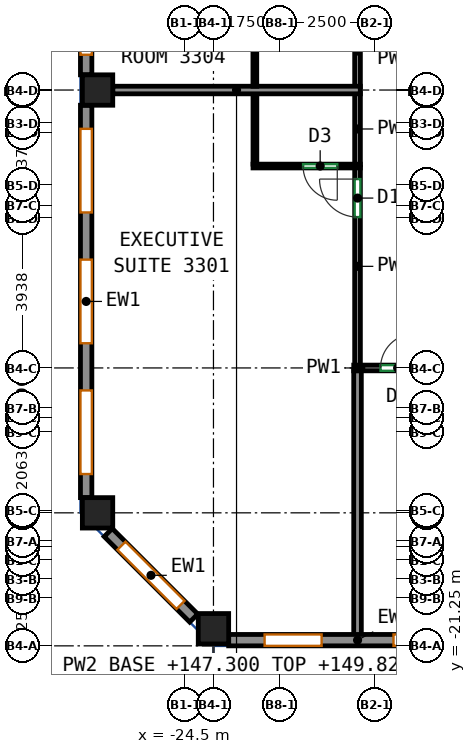
"""IFC4 building model, lengths in metres.
Left out: names, types, materials, properties, quantities, classifications, styles, units other than length and angle.
Written with IfcOpenShell. Run it as: python <this file> out.ifc"""

import sys

from ifc_helpers import new_model, si_unit, direction, frame, frame_2d, origin, origin_2d, place, context, subcontext, project, spatial, rectangle, extrude, source, transform, mapped, element, fill, save


model = new_model("IFC4")
c1 = context("Model", 3, precision=1e-05, world=origin(), true_north=direction((0.0, 1.0)))
c2 = subcontext(c1, "Body", "Model", "MODEL_VIEW")
j1 = project(units=[si_unit("LENGTHUNIT", "METRE"), si_unit("PLANEANGLEUNIT", "RADIAN")], contexts=[c1])
p1 = place(None, origin())
s1 = spatial("IfcSite", under=j1, at=p1, CompositionType="ELEMENT")
p2 = place(p1, origin())
s2 = spatial("IfcBuilding", under=s1, at=p2, CompositionType="ELEMENT")
p3 = place(p2, frame((0.0, 0.0, 147.3)))
s3 = spatial("IfcBuildingStorey", under=s2, at=p3, CompositionType="ELEMENT", Elevation=147.3)
m1 = source(origin(), c2, "Body", "SweptSolid", [
    extrude(rectangle(XDim=0.8, YDim=0.8, at=origin_2d()), origin(), (0.0, 0.0, 1.0), 3.12),
])
for number, where, z_axis, x_axis in (
    (1, (-26.8, -17.75, 0.0), (0.0, 0.0, 1.0), (1.0, 0.0, 0.0)),
    (2, (-26.8, -6.625, 0.0), (0.0, 0.0, 1.0), (1.0, 0.0, 0.0)),
    (3, (-23.75, -20.8, 0.0), (0.0, 0.0, 1.0), (1.0, 0.0, 0.0)),
):
    element("IfcColumn", number, at=place(p3, frame(where, z_axis=z_axis, x_axis=x_axis)), inside=s3, PredefinedType="COLUMN", context=c2, shape_type="MappedRepresentation", body=[
        mapped(m1, transform((0.0, 0.0, 0.0))),
    ])
m2 = source(origin(), c2, "Body", "SweptSolid", [
    extrude(rectangle(XDim=6.783, YDim=0.3, at=frame_2d((3.392, 0.0))), origin(), (0.0, 0.0, 1.0), 3.12),
])
p4 = place(p3, frame((-23.35, -21.1, 0.0), z_axis=(0.0, 0.0, 1.0), x_axis=(1.0, 0.0, 0.0)))
e4 = element("IfcWall", 4, at=p4, inside=s3, PredefinedType="SOLIDWALL", context=c2, shape_type="MappedRepresentation", body=[
    mapped(m2, transform((0.0, 0.0, 0.0))),
])
p5 = place(p4, frame((0.946, 0.0, 0.85)))
e5 = element("IfcOpeningElement", 5, at=p5, cuts=e4, PredefinedType="OPENING", context=c2, shape_type="SweptSolid", body=[
    extrude(rectangle(XDim=1.5, YDim=1.95, at=frame_2d((0.75, 0.975))), frame((0.0, 0.16, 0.0), z_axis=(0.0, -1.0, 0.0), x_axis=(1.0, 0.0, 0.0)), (0.0, 0.0, 1.0), 0.32),
])
p6 = place(p4, frame((4.337, 0.0, 0.85)))
e6 = element("IfcOpeningElement", 6, at=p6, cuts=e4, PredefinedType="OPENING", context=c2, shape_type="SweptSolid", body=[
    extrude(rectangle(XDim=1.5, YDim=1.95, at=frame_2d((0.75, 0.975))), frame((0.0, 0.16, 0.0), z_axis=(0.0, -1.0, 0.0), x_axis=(1.0, 0.0, 0.0)), (0.0, 0.0, 1.0), 0.32),
])
m3 = source(origin(), c2, "Body", "SweptSolid", [
    extrude(rectangle(XDim=6.513, YDim=0.3, at=frame_2d((3.256, 0.0))), origin(), (0.0, 0.0, 1.0), 3.12),
])
p7 = place(p3, frame((-27.1, 0.288, 0.0), z_axis=(0.0, 0.0, 1.0), x_axis=(0.0, -1.0, 0.0)))
e7 = element("IfcWall", 7, at=p7, inside=s3, PredefinedType="SOLIDWALL", context=c2, shape_type="MappedRepresentation", body=[
    mapped(m3, transform((0.0, 0.0, 0.0))),
])
p8 = place(p7, frame((0.528, 0.0, 0.85)))
e8 = element("IfcOpeningElement", 8, at=p8, cuts=e7, PredefinedType="OPENING", context=c2, shape_type="SweptSolid", body=[
    extrude(rectangle(XDim=2.2, YDim=1.95, at=frame_2d((1.1, 0.975))), frame((0.0, 0.16, 0.0), z_axis=(0.0, -1.0, 0.0), x_axis=(1.0, 0.0, 0.0)), (0.0, 0.0, 1.0), 0.32),
])
p9 = place(p7, frame((3.784, 0.0, 0.85)))
e9 = element("IfcOpeningElement", 9, at=p9, cuts=e7, PredefinedType="OPENING", context=c2, shape_type="SweptSolid", body=[
    extrude(rectangle(XDim=2.2, YDim=1.95, at=frame_2d((1.1, 0.975))), frame((0.0, 0.16, 0.0), z_axis=(0.0, -1.0, 0.0), x_axis=(1.0, 0.0, 0.0)), (0.0, 0.0, 1.0), 0.32),
])
m4 = source(origin(), c2, "Body", "SweptSolid", [
    extrude(rectangle(XDim=10.325, YDim=0.3, at=frame_2d((5.163, 0.0))), origin(), (0.0, 0.0, 1.0), 3.12),
])
p10 = place(p3, frame((-27.1, -7.025, 0.0), z_axis=(0.0, 0.0, 1.0), x_axis=(0.0, -1.0, 0.0)))
e10 = element("IfcWall", 10, at=p10, inside=s3, PredefinedType="SOLIDWALL", context=c2, shape_type="MappedRepresentation", body=[
    mapped(m4, transform((0.0, 0.0, 0.0))),
])
p11 = place(p10, frame((0.621, 0.0, 0.85)))
e11 = element("IfcOpeningElement", 11, at=p11, cuts=e10, PredefinedType="OPENING", context=c2, shape_type="SweptSolid", body=[
    extrude(rectangle(XDim=2.2, YDim=1.95, at=frame_2d((1.1, 0.975))), frame((0.0, 0.16, 0.0), z_axis=(0.0, -1.0, 0.0), x_axis=(1.0, 0.0, 0.0)), (0.0, 0.0, 1.0), 0.32),
])
p12 = place(p10, frame((4.062, 0.0, 0.85)))
e12 = element("IfcOpeningElement", 12, at=p12, cuts=e10, PredefinedType="OPENING", context=c2, shape_type="SweptSolid", body=[
    extrude(rectangle(XDim=2.2, YDim=1.95, at=frame_2d((1.1, 0.975))), frame((0.0, 0.16, 0.0), z_axis=(0.0, -1.0, 0.0), x_axis=(1.0, 0.0, 0.0)), (0.0, 0.0, 1.0), 0.32),
])
p13 = place(p10, frame((7.504, 0.0, 0.85)))
e13 = element("IfcOpeningElement", 13, at=p13, cuts=e10, PredefinedType="OPENING", context=c2, shape_type="SweptSolid", body=[
    extrude(rectangle(XDim=2.2, YDim=1.95, at=frame_2d((1.1, 0.975))), frame((0.0, 0.16, 0.0), z_axis=(0.0, -1.0, 0.0), x_axis=(1.0, 0.0, 0.0)), (0.0, 0.0, 1.0), 0.32),
])
m5 = source(origin(), c2, "Body", "SweptSolid", [
    extrude(rectangle(XDim=3.182, YDim=0.3, at=frame_2d((1.591, 0.0))), origin(), (0.0, 0.0, 1.0), 3.12),
])
p14 = place(p3, frame((-26.519, -18.269, 0.0), z_axis=(0.0, 0.0, 1.0), x_axis=(0.707068419229, -0.707145141063, 0.0)))
e14 = element("IfcWall", 14, at=p14, inside=s3, PredefinedType="SOLIDWALL", context=c2, shape_type="MappedRepresentation", body=[
    mapped(m5, transform((0.0, 0.0, 0.0))),
])
p15 = place(p14, frame((0.491, 0.0, 0.85)))
e15 = element("IfcOpeningElement", 15, at=p15, cuts=e14, PredefinedType="OPENING", context=c2, shape_type="SweptSolid", body=[
    extrude(rectangle(XDim=2.2, YDim=1.95, at=frame_2d((1.1, 0.975))), frame((0.0, 0.16, 0.0), z_axis=(0.0, -1.0, 0.0), x_axis=(1.0, 0.0, 0.0)), (0.0, 0.0, 1.0), 0.32),
])
p16 = place(p3, frame((-20.059, -13.938, 0.0), z_axis=(0.0, 0.0, 1.0), x_axis=(1.0, 0.0, 0.0)))
e16 = element("IfcWall", 16, at=p16, inside=s3, PredefinedType="PARTITIONING", context=c2, shape_type="SweptSolid", body=[
    extrude(rectangle(XDim=2.309, YDim=0.15, at=frame_2d((1.155, 0.0))), origin(), (0.0, 0.0, 1.0), 3.12),
])
p17 = place(p16, frame((0.705, 0.0, 0.0)))
e17 = element("IfcOpeningElement", 17, at=p17, cuts=e16, PredefinedType="OPENING", context=c2, shape_type="SweptSolid", body=[
    extrude(rectangle(XDim=0.9, YDim=2.1, at=frame_2d((0.45, 1.05))), frame((0.0, 0.085, 0.0), z_axis=(0.0, -1.0, 0.0), x_axis=(1.0, 0.0, 0.0)), (0.0, 0.0, 1.0), 0.17),
])
p18 = place(p3, frame((-19.959, -13.863, 0.0), z_axis=(0.0, 0.0, 1.0), x_axis=(0.0, 1.0, 0.0)))
e18 = element("IfcWall", 18, at=p18, inside=s3, PredefinedType="PARTITIONING", context=c2, shape_type="SweptSolid", body=[
    extrude(rectangle(XDim=5.198, YDim=0.15, at=frame_2d((2.599, 0.0))), origin(), (0.0, 0.0, 1.0), 3.12),
])
p19 = place(p18, frame((3.895, 0.0, 0.0)))
e19 = element("IfcOpeningElement", 19, at=p19, cuts=e18, PredefinedType="OPENING", context=c2, shape_type="SweptSolid", body=[
    extrude(rectangle(XDim=1.0, YDim=2.1, at=frame_2d((0.5, 1.05))), frame((0.0, 0.085, 0.0), z_axis=(0.0, -1.0, 0.0), x_axis=(1.0, 0.0, 0.0)), (0.0, 0.0, 1.0), 0.17),
])
for number, where, z_axis, x_axis in (
    (20, (-19.959, -8.585, 0.0), (0.0, 0.0, 1.0), (0.0, 1.0, 0.0)),
    (21, (-19.959, -6.535, 0.0), (0.0, 0.0, 1.0), (0.0, 1.0, 0.0)),
):
    element("IfcWall", number, at=place(p3, frame(where, z_axis=z_axis, x_axis=x_axis)), inside=s3, PredefinedType="PARTITIONING", context=c2, shape_type="SweptSolid", body=[
        extrude(rectangle(XDim=1.87, YDim=0.15, at=frame_2d((0.935, 0.0))), origin(), (0.0, 0.0, 1.0), 3.12),
    ])
p20 = place(p3, frame((-19.959, -21.0, 0.0), z_axis=(0.0, 0.0, 1.0), x_axis=(0.0, 1.0, 0.0)))
e22 = element("IfcWall", 22, at=p20, inside=s3, PredefinedType="PARTITIONING", context=c2, shape_type="SweptSolid", body=[
    extrude(rectangle(XDim=6.985, YDim=0.2, at=frame_2d((3.493, 0.0))), origin(), (0.0, 0.0, 1.0), 3.12),
])
p21 = place(p3, frame((-22.659, -8.575, 0.0), z_axis=(0.0, 0.0, 1.0), x_axis=(0.0, 1.0, 0.0)))
e23 = element("IfcWall", 23, at=p21, inside=s3, PredefinedType="PARTITIONING", context=c2, shape_type="SweptSolid", body=[
    extrude(rectangle(XDim=1.85, YDim=0.1, at=frame_2d((0.925, 0.0))), origin(), (0.0, 0.0, 1.0), 3.12),
])
p22 = place(p3, frame((-19.886, -8.625, 0.0), z_axis=(0.0, 0.0, 1.0), x_axis=(-1.0, 0.0, 0.0)))
e24 = element("IfcWall", 24, at=p22, inside=s3, PredefinedType="PARTITIONING", context=c2, shape_type="SweptSolid", body=[
    extrude(rectangle(XDim=2.823, YDim=0.1, at=frame_2d((1.412, 0.0))), origin(), (0.0, 0.0, 1.0), 3.12),
])
p23 = place(p22, frame((0.606, 0.0, 0.0)))
e25 = element("IfcOpeningElement", 25, at=p23, cuts=e24, PredefinedType="OPENING", context=c2, shape_type="SweptSolid", body=[
    extrude(rectangle(XDim=0.9, YDim=2.1, at=frame_2d((0.45, 1.05))), frame((0.0, 0.06, 0.0), z_axis=(0.0, -1.0, 0.0), x_axis=(1.0, 0.0, 0.0)), (0.0, 0.0, 1.0), 0.12),
])
p24 = place(p3, frame((-26.4, -6.625, 0.0), z_axis=(0.0, 0.0, 1.0), x_axis=(1.0, 0.0, 0.0)))
e26 = element("IfcWall", 26, at=p24, inside=s3, PredefinedType="PARTITIONING", context=c2, shape_type="SweptSolid", body=[
    extrude(rectangle(XDim=6.514, YDim=0.2, at=frame_2d((3.257, 0.0))), origin(), (0.0, 0.0, 1.0), 2.52),
])
p25 = place(p3, frame((-22.661, -6.525, 0.0), z_axis=(0.0, 0.0, 1.0), x_axis=(0.0, 1.0, 0.0)))
e27 = element("IfcWall", 27, at=p25, inside=s3, PredefinedType="PARTITIONING", context=c2, shape_type="SweptSolid", body=[
    extrude(rectangle(XDim=1.85, YDim=0.1, at=frame_2d((0.925, 0.0))), origin(), (0.0, 0.0, 1.0), 3.12),
])
p26 = place(p5, origin())
e28 = element("IfcWindow", 28, at=p26, inside=s3, PartitioningType="SINGLE_PANEL", PredefinedType="WINDOW", context=c2, shape_type="SweptSolid", body=[
    extrude(rectangle(XDim=1.5, YDim=1.95, at=frame_2d((0.75, 0.975))), frame((0.0, 0.03, 0.0), z_axis=(0.0, -1.0, 0.0), x_axis=(1.0, 0.0, 0.0)), (0.0, 0.0, 1.0), 0.06),
])
fill(e5, e28)
p27 = place(p6, origin())
e29 = element("IfcWindow", 29, at=p27, inside=s3, PartitioningType="SINGLE_PANEL", PredefinedType="WINDOW", context=c2, shape_type="SweptSolid", body=[
    extrude(rectangle(XDim=1.5, YDim=1.95, at=frame_2d((0.75, 0.975))), frame((0.0, 0.03, 0.0), z_axis=(0.0, -1.0, 0.0), x_axis=(1.0, 0.0, 0.0)), (0.0, 0.0, 1.0), 0.06),
])
fill(e6, e29)
p28 = place(p9, origin())
e30 = element("IfcWindow", 30, at=p28, inside=s3, PartitioningType="SINGLE_PANEL", PredefinedType="WINDOW", context=c2, shape_type="SweptSolid", body=[
    extrude(rectangle(XDim=2.2, YDim=1.95, at=frame_2d((1.1, 0.975))), frame((0.0, 0.03, 0.0), z_axis=(0.0, -1.0, 0.0), x_axis=(1.0, 0.0, 0.0)), (0.0, 0.0, 1.0), 0.06),
])
fill(e9, e30)
p29 = place(p11, origin())
e31 = element("IfcWindow", 31, at=p29, inside=s3, PartitioningType="SINGLE_PANEL", PredefinedType="WINDOW", context=c2, shape_type="SweptSolid", body=[
    extrude(rectangle(XDim=2.2, YDim=1.95, at=frame_2d((1.1, 0.975))), frame((0.0, 0.03, 0.0), z_axis=(0.0, -1.0, 0.0), x_axis=(1.0, 0.0, 0.0)), (0.0, 0.0, 1.0), 0.06),
])
fill(e11, e31)
p30 = place(p12, origin())
e32 = element("IfcWindow", 32, at=p30, inside=s3, PartitioningType="SINGLE_PANEL", PredefinedType="WINDOW", context=c2, shape_type="SweptSolid", body=[
    extrude(rectangle(XDim=2.2, YDim=1.95, at=frame_2d((1.1, 0.975))), frame((0.0, 0.03, 0.0), z_axis=(0.0, -1.0, 0.0), x_axis=(1.0, 0.0, 0.0)), (0.0, 0.0, 1.0), 0.06),
])
fill(e12, e32)
p31 = place(p13, origin())
e33 = element("IfcWindow", 33, at=p31, inside=s3, PartitioningType="SINGLE_PANEL", PredefinedType="WINDOW", context=c2, shape_type="SweptSolid", body=[
    extrude(rectangle(XDim=2.2, YDim=1.95, at=frame_2d((1.1, 0.975))), frame((0.0, 0.03, 0.0), z_axis=(0.0, -1.0, 0.0), x_axis=(1.0, 0.0, 0.0)), (0.0, 0.0, 1.0), 0.06),
])
fill(e13, e33)
p32 = place(p15, origin())
e34 = element("IfcWindow", 34, at=p32, inside=s3, PartitioningType="SINGLE_PANEL", PredefinedType="WINDOW", context=c2, shape_type="SweptSolid", body=[
    extrude(rectangle(XDim=2.2, YDim=1.95, at=frame_2d((1.1, 0.975))), frame((0.0, 0.03, 0.0), z_axis=(0.0, -1.0, 0.0), x_axis=(1.0, 0.0, 0.0)), (0.0, 0.0, 1.0), 0.06),
])
fill(e15, e34)
p33 = place(p17, origin())
e35 = element("IfcDoor", 35, at=p33, inside=s3, OperationType="SINGLE_SWING_RIGHT", PredefinedType="DOOR", context=c2, shape_type="SweptSolid", body=[
    extrude(rectangle(XDim=0.9, YDim=2.1, at=frame_2d((0.45, 1.05))), frame((0.0, 0.025, 0.0), z_axis=(0.0, -1.0, 0.0), x_axis=(1.0, 0.0, 0.0)), (0.0, 0.0, 1.0), 0.05),
])
fill(e17, e35)
p34 = place(p19, origin())
e36 = element("IfcDoor", 36, at=p34, inside=s3, OperationType="SINGLE_SWING_RIGHT", PredefinedType="DOOR", context=c2, shape_type="SweptSolid", body=[
    extrude(rectangle(XDim=1.0, YDim=2.1, at=frame_2d((0.5, 1.05))), frame((0.0, 0.025, 0.0), z_axis=(0.0, -1.0, 0.0), x_axis=(1.0, 0.0, 0.0)), (0.0, 0.0, 1.0), 0.05),
])
fill(e19, e36)
p35 = place(p23, origin())
e37 = element("IfcDoor", 37, at=p35, inside=s3, OperationType="SINGLE_SWING_LEFT", PredefinedType="DOOR", context=c2, shape_type="SweptSolid", body=[
    extrude(rectangle(XDim=0.9, YDim=2.1, at=frame_2d((0.45, 1.05))), frame((0.0, 0.025, 0.0), z_axis=(0.0, -1.0, 0.0), x_axis=(1.0, 0.0, 0.0)), (0.0, 0.0, 1.0), 0.05),
])
fill(e25, e37)
save(model, sys.argv[1])
